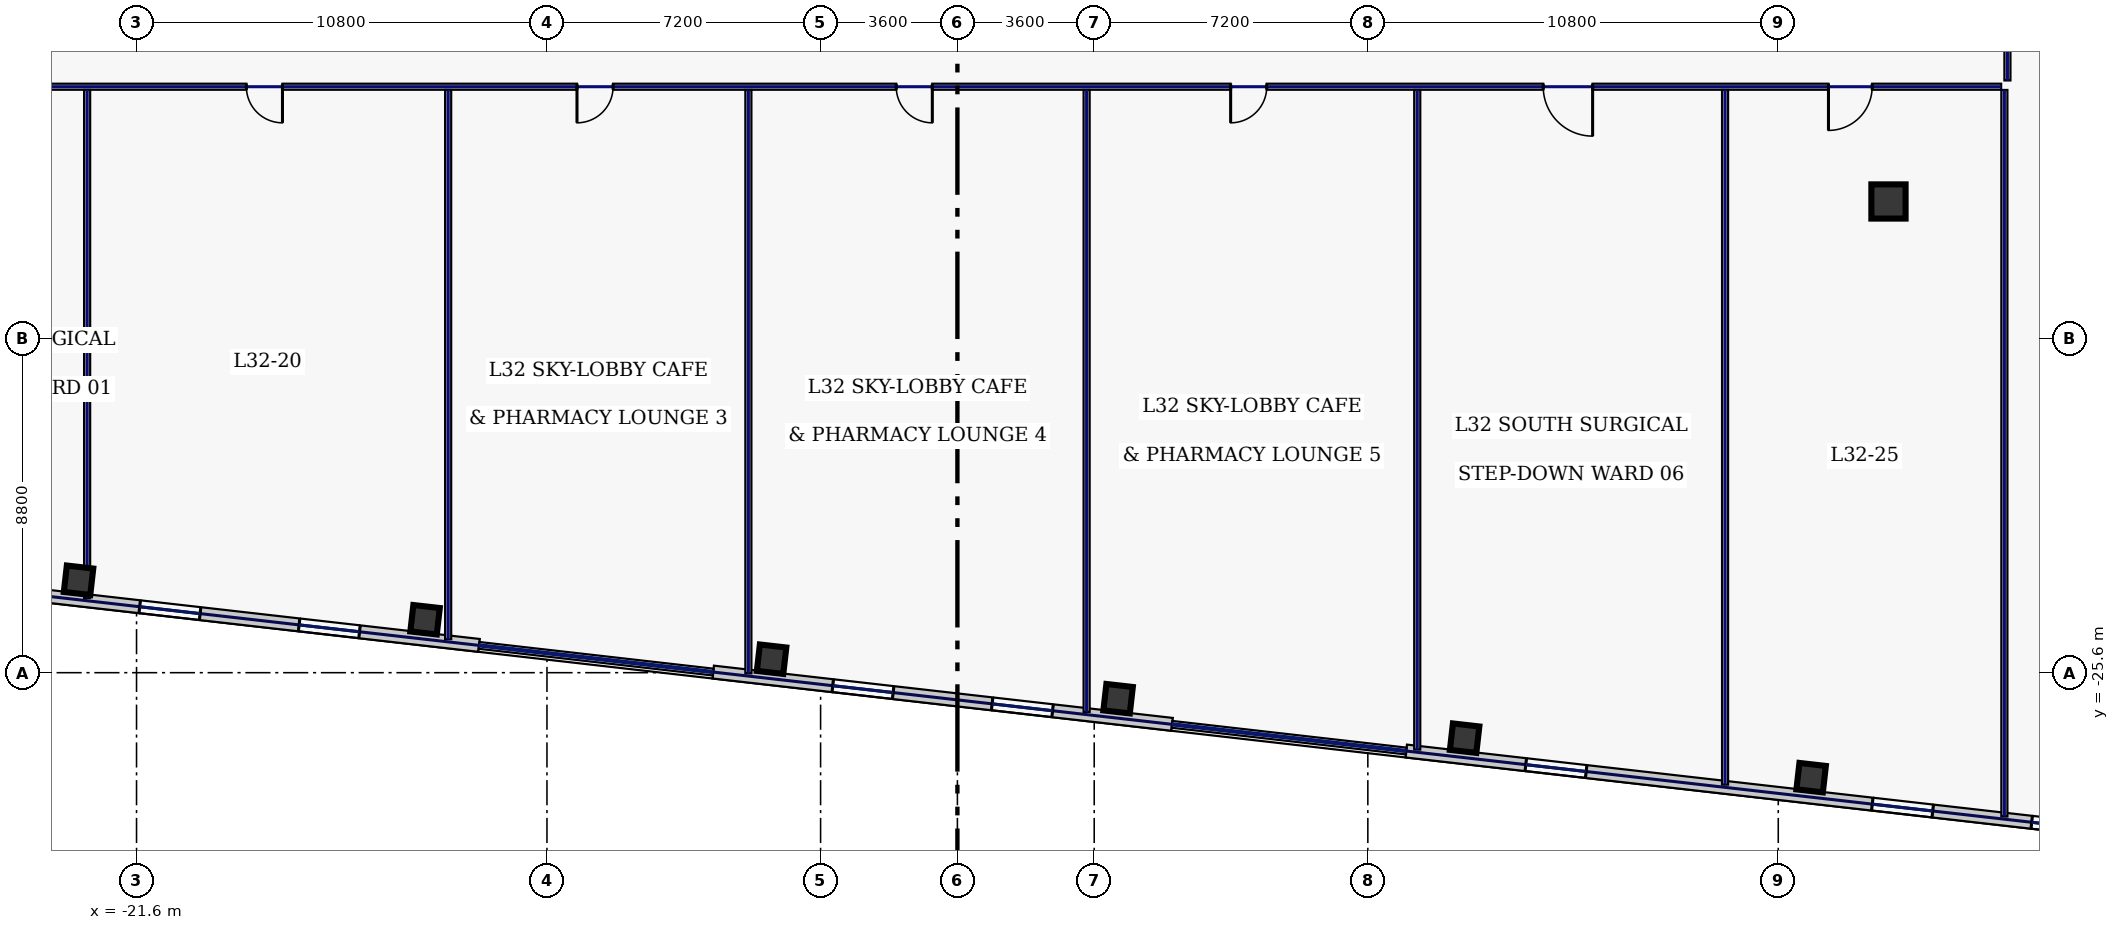
"""IFC4 building model, lengths in metres.
Left out: names, types, materials, properties, quantities, classifications, styles, units other than length and angle.
Written with IfcOpenShell. Run it as: python <this file> out.ifc"""

import sys

from ifc_helpers import new_model, si_unit, direction, frame, frame_2d, origin, origin_2d, place, context, subcontext, project, spatial, rectangle, hollow_rectangle, extrude, element, fill, save


model = new_model("IFC4")
c1 = context("Model", 3, precision=1e-05, world=origin(), true_north=direction((0.0, 1.0)))
c2 = subcontext(c1, "Body", "Model", "MODEL_VIEW")
j1 = project(units=[si_unit("LENGTHUNIT", "METRE"), si_unit("PLANEANGLEUNIT", "RADIAN")], contexts=[c1])
p1 = place(None, origin())
s1 = spatial("IfcSite", under=j1, at=p1, CompositionType="ELEMENT")
p2 = place(p1, origin())
s2 = spatial("IfcBuilding", under=s1, at=p2, CompositionType="ELEMENT")
p3 = place(p2, frame((0.0, 0.0, 141.4)))
s3 = spatial("IfcBuildingStorey", under=s2, at=p3, CompositionType="ELEMENT", Elevation=141.4)
p4 = place(p3, frame((24.5, -13.2, 0.0), z_axis=(0.0, 0.0, 1.0), x_axis=(1.0, 0.0, 0.0)))
e1 = element("IfcColumn", 1, at=p4, inside=s3, PredefinedType="COLUMN", context=c2, shape_type="SweptSolid", body=[
    extrude(hollow_rectangle(XDim=0.9, YDim=0.9, WallThickness=0.04, at=origin_2d()), origin(), (0.0, 0.0, 1.0), 4.48),
])
for number, where, z_axis, x_axis in (
    (2, (-23.126, -23.168, 0.0), (0.0, 0.0, 1.0), (0.994, -0.113, 0.0)),
    (3, (-14.008, -24.207, 0.0), (0.0, 0.0, 1.0), (0.994, -0.113, 0.0)),
    (4, (-4.89, -25.246, 0.0), (0.0, 0.0, 1.0), (0.994, -0.113, 0.0)),
    (5, (4.229, -26.284, 0.0), (0.0, 0.0, 1.0), (0.994, -0.113, 0.0)),
    (6, (13.347, -27.323, 0.0), (0.0, 0.0, 1.0), (0.994, -0.113, 0.0)),
    (7, (22.465, -28.362, 0.0), (0.0, 0.0, 1.0), (0.994, -0.113, 0.0)),
):
    element("IfcColumn", number, at=place(p3, frame(where, z_axis=z_axis, x_axis=x_axis)), inside=s3, PredefinedType="COLUMN", context=c2, shape_type="SweptSolid", body=[
        extrude(hollow_rectangle(XDim=0.7, YDim=0.7, WallThickness=0.032, at=origin_2d()), origin(), (0.0, 0.0, 1.0), 4.48),
    ])
p5 = place(p3, frame((-32.977, -22.559, 0.0), z_axis=(0.0, 0.0, 1.0), x_axis=(0.993571877006, -0.113203026563, 0.0)))
e8 = element("IfcWall", 8, at=p5, inside=s3, PredefinedType="STANDARD", context=c2, shape_type="SweptSolid", body=[
    extrude(rectangle(XDim=20.523, YDim=0.34, at=frame_2d((10.261, 0.0))), origin(), (0.0, 0.0, 1.0), 4.48),
])
p6 = place(p5, frame((2.358, 0.0, 0.22)))
e9 = element("IfcOpeningElement", 9, at=p6, cuts=e8, PredefinedType="OPENING", context=c2, shape_type="SweptSolid", body=[
    extrude(rectangle(XDim=1.6, YDim=1.2, at=frame_2d((0.8, 0.6))), frame((0.0, 0.18, 0.0), z_axis=(0.0, -1.0, 0.0), x_axis=(1.0, 0.0, 0.0)), (0.0, 0.0, 1.0), 0.36),
])
p7 = place(p5, frame((6.579, 0.0, 0.22)))
e10 = element("IfcOpeningElement", 10, at=p7, cuts=e8, PredefinedType="OPENING", context=c2, shape_type="SweptSolid", body=[
    extrude(rectangle(XDim=1.6, YDim=1.2, at=frame_2d((0.8, 0.6))), frame((0.0, 0.18, 0.0), z_axis=(0.0, -1.0, 0.0), x_axis=(1.0, 0.0, 0.0)), (0.0, 0.0, 1.0), 0.36),
])
p8 = place(p5, frame((11.535, 0.0, 0.22)))
e11 = element("IfcOpeningElement", 11, at=p8, cuts=e8, PredefinedType="OPENING", context=c2, shape_type="SweptSolid", body=[
    extrude(rectangle(XDim=1.6, YDim=1.2, at=frame_2d((0.8, 0.6))), frame((0.0, 0.18, 0.0), z_axis=(0.0, -1.0, 0.0), x_axis=(1.0, 0.0, 0.0)), (0.0, 0.0, 1.0), 0.36),
])
p9 = place(p5, frame((15.756, 0.0, 0.22)))
e12 = element("IfcOpeningElement", 12, at=p9, cuts=e8, PredefinedType="OPENING", context=c2, shape_type="SweptSolid", body=[
    extrude(rectangle(XDim=1.6, YDim=1.2, at=frame_2d((0.8, 0.6))), frame((0.0, 0.18, 0.0), z_axis=(0.0, -1.0, 0.0), x_axis=(1.0, 0.0, 0.0)), (0.0, 0.0, 1.0), 0.36),
])
p10 = place(p3, frame((-6.426, -25.584, 0.0), z_axis=(0.0, 0.0, 1.0), x_axis=(0.993571202571, -0.113208945853, 0.0)))
e13 = element("IfcWall", 13, at=p10, inside=s3, PredefinedType="STANDARD", context=c2, shape_type="SweptSolid", body=[
    extrude(rectangle(XDim=12.154, YDim=0.34, at=frame_2d((6.077, 0.0))), origin(), (0.0, 0.0, 1.0), 4.48),
])
p11 = place(p10, frame((3.167, 0.0, 0.22)))
e14 = element("IfcOpeningElement", 14, at=p11, cuts=e13, PredefinedType="OPENING", context=c2, shape_type="SweptSolid", body=[
    extrude(rectangle(XDim=1.6, YDim=1.2, at=frame_2d((0.8, 0.6))), frame((0.0, 0.18, 0.0), z_axis=(0.0, -1.0, 0.0), x_axis=(1.0, 0.0, 0.0)), (0.0, 0.0, 1.0), 0.36),
])
p12 = place(p10, frame((7.388, 0.0, 0.22)))
e15 = element("IfcOpeningElement", 15, at=p12, cuts=e13, PredefinedType="OPENING", context=c2, shape_type="SweptSolid", body=[
    extrude(rectangle(XDim=1.6, YDim=1.2, at=frame_2d((0.8, 0.6))), frame((0.0, 0.18, 0.0), z_axis=(0.0, -1.0, 0.0), x_axis=(1.0, 0.0, 0.0)), (0.0, 0.0, 1.0), 0.36),
])
p13 = place(p3, frame((11.81, -27.662, 0.0), z_axis=(0.0, 0.0, 1.0), x_axis=(0.993573214953, -0.113191282914, 0.0)))
e16 = element("IfcWall", 16, at=p13, inside=s3, PredefinedType="STANDARD", context=c2, shape_type="SweptSolid", body=[
    extrude(rectangle(XDim=20.523, YDim=0.34, at=frame_2d((10.261, 0.0))), origin(), (0.0, 0.0, 1.0), 4.48),
])
p14 = place(p13, frame((3.167, 0.0, 0.22)))
e17 = element("IfcOpeningElement", 17, at=p14, cuts=e16, PredefinedType="OPENING", context=c2, shape_type="SweptSolid", body=[
    extrude(rectangle(XDim=1.6, YDim=1.2, at=frame_2d((0.8, 0.6))), frame((0.0, 0.18, 0.0), z_axis=(0.0, -1.0, 0.0), x_axis=(1.0, 0.0, 0.0)), (0.0, 0.0, 1.0), 0.36),
])
p15 = place(p13, frame((12.344, 0.0, 0.22)))
e18 = element("IfcOpeningElement", 18, at=p15, cuts=e16, PredefinedType="OPENING", context=c2, shape_type="SweptSolid", body=[
    extrude(rectangle(XDim=1.6, YDim=1.2, at=frame_2d((0.8, 0.6))), frame((0.0, 0.18, 0.0), z_axis=(0.0, -1.0, 0.0), x_axis=(1.0, 0.0, 0.0)), (0.0, 0.0, 1.0), 0.36),
])
p16 = place(p13, frame((16.565, 0.0, 0.22)))
e19 = element("IfcOpeningElement", 19, at=p16, cuts=e16, PredefinedType="OPENING", context=c2, shape_type="SweptSolid", body=[
    extrude(rectangle(XDim=1.6, YDim=1.2, at=frame_2d((0.8, 0.6))), frame((0.0, 0.18, 0.0), z_axis=(0.0, -1.0, 0.0), x_axis=(1.0, 0.0, 0.0)), (0.0, 0.0, 1.0), 0.36),
])
p17 = place(p3, frame((27.63, 10.115, 0.0), z_axis=(0.0, 0.0, 1.0), x_axis=(0.0, -1.0, 0.0)))
e20 = element("IfcWall", 20, at=p17, inside=s3, PredefinedType="PARTITIONING", context=c2, shape_type="SweptSolid", body=[
    extrude(rectangle(XDim=20.13, YDim=0.16, at=frame_2d((10.065, 0.0))), origin(), (0.0, 0.0, 1.0), 4.48),
])
p18 = place(p17, frame((17.181, 0.0, 0.0)))
e21 = element("IfcOpeningElement", 21, at=p18, cuts=e20, PredefinedType="OPENING", context=c2, shape_type="SweptSolid", body=[
    extrude(rectangle(XDim=0.95, YDim=2.2, at=frame_2d((0.475, 1.1))), frame((0.0, 0.09, 0.0), z_axis=(0.0, -1.0, 0.0), x_axis=(1.0, 0.0, 0.0)), (0.0, 0.0, 1.0), 0.18),
])
p19 = place(p17, frame((12.95, 0.0, 0.0)))
e22 = element("IfcOpeningElement", 22, at=p19, cuts=e20, PredefinedType="OPENING", context=c2, shape_type="SweptSolid", body=[
    extrude(rectangle(XDim=0.95, YDim=2.2, at=frame_2d((0.475, 1.1))), frame((0.0, 0.09, 0.0), z_axis=(0.0, -1.0, 0.0), x_axis=(1.0, 0.0, 0.0)), (0.0, 0.0, 1.0), 0.18),
])
p20 = place(p17, frame((7.45, 0.0, 0.0)))
e23 = element("IfcOpeningElement", 23, at=p20, cuts=e20, PredefinedType="OPENING", context=c2, shape_type="SweptSolid", body=[
    extrude(rectangle(XDim=0.95, YDim=2.2, at=frame_2d((0.475, 1.1))), frame((0.0, 0.09, 0.0), z_axis=(0.0, -1.0, 0.0), x_axis=(1.0, 0.0, 0.0)), (0.0, 0.0, 1.0), 0.18),
])
p21 = place(p17, frame((2.219, 0.0, 0.0)))
e24 = element("IfcOpeningElement", 24, at=p21, cuts=e20, PredefinedType="OPENING", context=c2, shape_type="SweptSolid", body=[
    extrude(rectangle(XDim=0.95, YDim=2.2, at=frame_2d((0.475, 1.1))), frame((0.0, 0.09, 0.0), z_axis=(0.0, -1.0, 0.0), x_axis=(1.0, 0.0, 0.0)), (0.0, 0.0, 1.0), 0.18),
])
p22 = place(p3, frame((27.465, -10.18, 0.0), z_axis=(0.0, 0.0, 1.0), x_axis=(-1.0, 0.0, 0.0)))
e25 = element("IfcWall", 25, at=p22, inside=s3, PredefinedType="PARTITIONING", context=c2, shape_type="SweptSolid", body=[
    extrude(rectangle(XDim=54.93, YDim=0.16, at=frame_2d((27.465, 0.0))), origin(), (0.0, 0.0, 1.0), 4.48),
])
p23 = place(p22, frame((51.931, 0.0, 0.0)))
e26 = element("IfcOpeningElement", 26, at=p23, cuts=e25, PredefinedType="OPENING", context=c2, shape_type="SweptSolid", body=[
    extrude(rectangle(XDim=1.3, YDim=2.2, at=frame_2d((0.65, 1.1))), frame((0.0, 0.09, 0.0), z_axis=(0.0, -1.0, 0.0), x_axis=(1.0, 0.0, 0.0)), (0.0, 0.0, 1.0), 0.18),
])
p24 = place(p22, frame((45.225, 0.0, 0.0)))
e27 = element("IfcOpeningElement", 27, at=p24, cuts=e25, PredefinedType="OPENING", context=c2, shape_type="SweptSolid", body=[
    extrude(rectangle(XDim=0.95, YDim=2.2, at=frame_2d((0.475, 1.1))), frame((0.0, 0.09, 0.0), z_axis=(0.0, -1.0, 0.0), x_axis=(1.0, 0.0, 0.0)), (0.0, 0.0, 1.0), 0.18),
])
p25 = place(p22, frame((36.525, 0.0, 0.0)))
e28 = element("IfcOpeningElement", 28, at=p25, cuts=e25, PredefinedType="OPENING", context=c2, shape_type="SweptSolid", body=[
    extrude(rectangle(XDim=0.95, YDim=2.2, at=frame_2d((0.475, 1.1))), frame((0.0, 0.09, 0.0), z_axis=(0.0, -1.0, 0.0), x_axis=(1.0, 0.0, 0.0)), (0.0, 0.0, 1.0), 0.18),
])
p26 = place(p22, frame((28.125, 0.0, 0.0)))
e29 = element("IfcOpeningElement", 29, at=p26, cuts=e25, PredefinedType="OPENING", context=c2, shape_type="SweptSolid", body=[
    extrude(rectangle(XDim=0.95, YDim=2.2, at=frame_2d((0.475, 1.1))), frame((0.0, 0.09, 0.0), z_axis=(0.0, -1.0, 0.0), x_axis=(1.0, 0.0, 0.0)), (0.0, 0.0, 1.0), 0.18),
])
p27 = place(p22, frame((19.325, 0.0, 0.0)))
e30 = element("IfcOpeningElement", 30, at=p27, cuts=e25, PredefinedType="OPENING", context=c2, shape_type="SweptSolid", body=[
    extrude(rectangle(XDim=0.95, YDim=2.2, at=frame_2d((0.475, 1.1))), frame((0.0, 0.09, 0.0), z_axis=(0.0, -1.0, 0.0), x_axis=(1.0, 0.0, 0.0)), (0.0, 0.0, 1.0), 0.18),
])
p28 = place(p22, frame((10.75, 0.0, 0.0)))
e31 = element("IfcOpeningElement", 31, at=p28, cuts=e25, PredefinedType="OPENING", context=c2, shape_type="SweptSolid", body=[
    extrude(rectangle(XDim=1.3, YDim=2.2, at=frame_2d((0.65, 1.1))), frame((0.0, 0.09, 0.0), z_axis=(0.0, -1.0, 0.0), x_axis=(1.0, 0.0, 0.0)), (0.0, 0.0, 1.0), 0.18),
])
p29 = place(p22, frame((3.394, 0.0, 0.0)))
e32 = element("IfcOpeningElement", 32, at=p29, cuts=e25, PredefinedType="OPENING", context=c2, shape_type="SweptSolid", body=[
    extrude(rectangle(XDim=1.15, YDim=2.2, at=frame_2d((0.575, 1.1))), frame((0.0, 0.09, 0.0), z_axis=(0.0, -1.0, 0.0), x_axis=(1.0, 0.0, 0.0)), (0.0, 0.0, 1.0), 0.18),
])
p30 = place(p3, frame((27.55, -29.385, 0.0), z_axis=(0.0, 0.0, 1.0), x_axis=(0.0, 1.0, 0.0)))
e33 = element("IfcWall", 33, at=p30, inside=s3, PredefinedType="PARTITIONING", context=c2, shape_type="SweptSolid", body=[
    extrude(rectangle(XDim=19.12, YDim=0.16, at=frame_2d((9.56, 0.0))), origin(), (0.0, 0.0, 1.0), 4.48),
])
p31 = place(p3, frame((-22.9, -23.636, 0.0), z_axis=(0.0, 0.0, 1.0), x_axis=(0.0, 1.0, 0.0)))
e34 = element("IfcWall", 34, at=p31, inside=s3, PredefinedType="PARTITIONING", context=c2, shape_type="SweptSolid", body=[
    extrude(rectangle(XDim=13.371, YDim=0.16, at=frame_2d((6.686, 0.0))), origin(), (0.0, 0.0, 1.0), 4.48),
])
p32 = place(p3, frame((-13.4, -24.719, 0.0), z_axis=(0.0, 0.0, 1.0), x_axis=(0.0, 1.0, 0.0)))
e35 = element("IfcWall", 35, at=p32, inside=s3, PredefinedType="PARTITIONING", context=c2, shape_type="SweptSolid", body=[
    extrude(rectangle(XDim=14.454, YDim=0.16, at=frame_2d((7.227, 0.0))), origin(), (0.0, 0.0, 1.0), 4.48),
])
p33 = place(p3, frame((-5.5, -25.619, 0.0), z_axis=(0.0, 0.0, 1.0), x_axis=(0.0, 1.0, 0.0)))
e36 = element("IfcWall", 36, at=p33, inside=s3, PredefinedType="PARTITIONING", context=c2, shape_type="SweptSolid", body=[
    extrude(rectangle(XDim=15.354, YDim=0.16, at=frame_2d((7.677, 0.0))), origin(), (0.0, 0.0, 1.0), 4.48),
])
p34 = place(p3, frame((3.4, -26.633, 0.0), z_axis=(0.0, 0.0, 1.0), x_axis=(0.0, 1.0, 0.0)))
e37 = element("IfcWall", 37, at=p34, inside=s3, PredefinedType="PARTITIONING", context=c2, shape_type="SweptSolid", body=[
    extrude(rectangle(XDim=16.368, YDim=0.16, at=frame_2d((8.184, 0.0))), origin(), (0.0, 0.0, 1.0), 4.48),
])
p35 = place(p3, frame((12.1, -27.624, 0.0), z_axis=(0.0, 0.0, 1.0), x_axis=(0.0, 1.0, 0.0)))
e38 = element("IfcWall", 38, at=p35, inside=s3, PredefinedType="PARTITIONING", context=c2, shape_type="SweptSolid", body=[
    extrude(rectangle(XDim=17.359, YDim=0.16, at=frame_2d((8.68, 0.0))), origin(), (0.0, 0.0, 1.0), 4.48),
])
p36 = place(p3, frame((20.2, -28.547, 0.0), z_axis=(0.0, 0.0, 1.0), x_axis=(0.0, 1.0, 0.0)))
e39 = element("IfcWall", 39, at=p36, inside=s3, PredefinedType="PARTITIONING", context=c2, shape_type="SweptSolid", body=[
    extrude(rectangle(XDim=18.282, YDim=0.16, at=frame_2d((9.141, 0.0))), origin(), (0.0, 0.0, 1.0), 4.48),
])
p37 = place(p8, origin())
e40 = element("IfcWindow", 40, at=p37, inside=s3, PartitioningType="SINGLE_PANEL", PredefinedType="WINDOW", context=c2, shape_type="SweptSolid", body=[
    extrude(rectangle(XDim=1.6, YDim=1.2, at=frame_2d((0.8, 0.6))), frame((0.0, 0.03, 0.0), z_axis=(0.0, -1.0, 0.0), x_axis=(1.0, 0.0, 0.0)), (0.0, 0.0, 1.0), 0.06),
])
fill(e11, e40)
p38 = place(p9, origin())
e41 = element("IfcWindow", 41, at=p38, inside=s3, PartitioningType="SINGLE_PANEL", PredefinedType="WINDOW", context=c2, shape_type="SweptSolid", body=[
    extrude(rectangle(XDim=1.6, YDim=1.2, at=frame_2d((0.8, 0.6))), frame((0.0, 0.03, 0.0), z_axis=(0.0, -1.0, 0.0), x_axis=(1.0, 0.0, 0.0)), (0.0, 0.0, 1.0), 0.06),
])
fill(e12, e41)
p39 = place(p11, origin())
e42 = element("IfcWindow", 42, at=p39, inside=s3, PartitioningType="SINGLE_PANEL", PredefinedType="WINDOW", context=c2, shape_type="SweptSolid", body=[
    extrude(rectangle(XDim=1.6, YDim=1.2, at=frame_2d((0.8, 0.6))), frame((0.0, 0.03, 0.0), z_axis=(0.0, -1.0, 0.0), x_axis=(1.0, 0.0, 0.0)), (0.0, 0.0, 1.0), 0.06),
])
fill(e14, e42)
p40 = place(p12, origin())
e43 = element("IfcWindow", 43, at=p40, inside=s3, PartitioningType="SINGLE_PANEL", PredefinedType="WINDOW", context=c2, shape_type="SweptSolid", body=[
    extrude(rectangle(XDim=1.6, YDim=1.2, at=frame_2d((0.8, 0.6))), frame((0.0, 0.03, 0.0), z_axis=(0.0, -1.0, 0.0), x_axis=(1.0, 0.0, 0.0)), (0.0, 0.0, 1.0), 0.06),
])
fill(e15, e43)
p41 = place(p14, origin())
e44 = element("IfcWindow", 44, at=p41, inside=s3, PartitioningType="SINGLE_PANEL", PredefinedType="WINDOW", context=c2, shape_type="SweptSolid", body=[
    extrude(rectangle(XDim=1.6, YDim=1.2, at=frame_2d((0.8, 0.6))), frame((0.0, 0.03, 0.0), z_axis=(0.0, -1.0, 0.0), x_axis=(1.0, 0.0, 0.0)), (0.0, 0.0, 1.0), 0.06),
])
fill(e17, e44)
p42 = place(p15, origin())
e45 = element("IfcWindow", 45, at=p42, inside=s3, PartitioningType="SINGLE_PANEL", PredefinedType="WINDOW", context=c2, shape_type="SweptSolid", body=[
    extrude(rectangle(XDim=1.6, YDim=1.2, at=frame_2d((0.8, 0.6))), frame((0.0, 0.03, 0.0), z_axis=(0.0, -1.0, 0.0), x_axis=(1.0, 0.0, 0.0)), (0.0, 0.0, 1.0), 0.06),
])
fill(e18, e45)
p43 = place(p16, origin())
e46 = element("IfcWindow", 46, at=p43, inside=s3, PartitioningType="SINGLE_PANEL", PredefinedType="WINDOW", context=c2, shape_type="SweptSolid", body=[
    extrude(rectangle(XDim=1.6, YDim=1.2, at=frame_2d((0.8, 0.6))), frame((0.0, 0.03, 0.0), z_axis=(0.0, -1.0, 0.0), x_axis=(1.0, 0.0, 0.0)), (0.0, 0.0, 1.0), 0.06),
])
fill(e19, e46)
p44 = place(p24, origin())
e47 = element("IfcDoor", 47, at=p44, inside=s3, OperationType="SINGLE_SWING_LEFT", PredefinedType="DOOR", context=c2, shape_type="SweptSolid", body=[
    extrude(rectangle(XDim=0.95, YDim=2.2, at=frame_2d((0.475, 1.1))), frame((0.0, 0.025, 0.0), z_axis=(0.0, -1.0, 0.0), x_axis=(1.0, 0.0, 0.0)), (0.0, 0.0, 1.0), 0.05),
])
fill(e27, e47)
p45 = place(p25, origin())
e48 = element("IfcDoor", 48, at=p45, inside=s3, OperationType="SINGLE_SWING_RIGHT", PredefinedType="DOOR", context=c2, shape_type="SweptSolid", body=[
    extrude(rectangle(XDim=0.95, YDim=2.2, at=frame_2d((0.475, 1.1))), frame((0.0, 0.025, 0.0), z_axis=(0.0, -1.0, 0.0), x_axis=(1.0, 0.0, 0.0)), (0.0, 0.0, 1.0), 0.05),
])
fill(e28, e48)
p46 = place(p26, origin())
e49 = element("IfcDoor", 49, at=p46, inside=s3, OperationType="SINGLE_SWING_LEFT", PredefinedType="DOOR", context=c2, shape_type="SweptSolid", body=[
    extrude(rectangle(XDim=0.95, YDim=2.2, at=frame_2d((0.475, 1.1))), frame((0.0, 0.025, 0.0), z_axis=(0.0, -1.0, 0.0), x_axis=(1.0, 0.0, 0.0)), (0.0, 0.0, 1.0), 0.05),
])
fill(e29, e49)
p47 = place(p27, origin())
e50 = element("IfcDoor", 50, at=p47, inside=s3, OperationType="SINGLE_SWING_RIGHT", PredefinedType="DOOR", context=c2, shape_type="SweptSolid", body=[
    extrude(rectangle(XDim=0.95, YDim=2.2, at=frame_2d((0.475, 1.1))), frame((0.0, 0.025, 0.0), z_axis=(0.0, -1.0, 0.0), x_axis=(1.0, 0.0, 0.0)), (0.0, 0.0, 1.0), 0.05),
])
fill(e30, e50)
p48 = place(p28, origin())
e51 = element("IfcDoor", 51, at=p48, inside=s3, OperationType="SINGLE_SWING_LEFT", PredefinedType="DOOR", context=c2, shape_type="SweptSolid", body=[
    extrude(rectangle(XDim=1.3, YDim=2.2, at=frame_2d((0.65, 1.1))), frame((0.0, 0.025, 0.0), z_axis=(0.0, -1.0, 0.0), x_axis=(1.0, 0.0, 0.0)), (0.0, 0.0, 1.0), 0.05),
])
fill(e31, e51)
p49 = place(p29, origin())
e52 = element("IfcDoor", 52, at=p49, inside=s3, OperationType="SINGLE_SWING_RIGHT", PredefinedType="DOOR", context=c2, shape_type="SweptSolid", body=[
    extrude(rectangle(XDim=1.15, YDim=2.2, at=frame_2d((0.575, 1.1))), frame((0.0, 0.025, 0.0), z_axis=(0.0, -1.0, 0.0), x_axis=(1.0, 0.0, 0.0)), (0.0, 0.0, 1.0), 0.05),
])
fill(e32, e52)
save(model, sys.argv[1])
